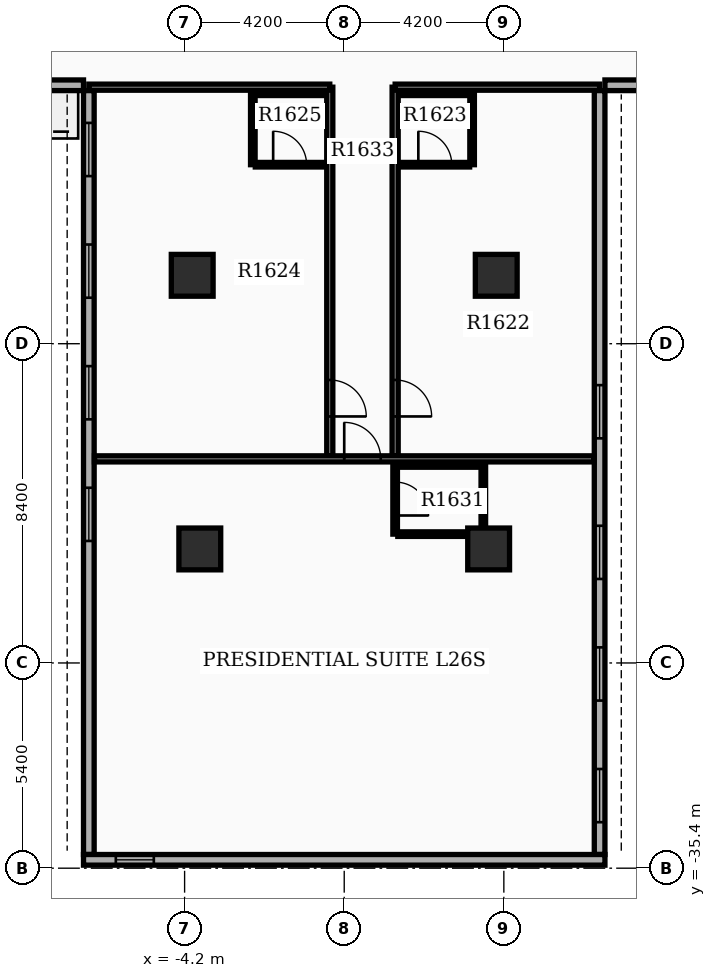
"""IFC4 building model, lengths in metres.
Left out: names, types, materials, properties, quantities, classifications, styles, units other than length and angle.
Written with IfcOpenShell. Run it as: python <this file> out.ifc"""

import sys

from ifc_helpers import new_model, si_unit, direction, frame, frame_2d, origin, origin_2d, place, context, subcontext, project, spatial, rectangle, extrude, element, fill, save


model = new_model("IFC4")
c1 = context("Model", 3, precision=1e-05, world=origin(), true_north=direction((0.0, 1.0)))
c2 = subcontext(c1, "Body", "Model", "MODEL_VIEW")
j1 = project(units=[si_unit("LENGTHUNIT", "METRE"), si_unit("PLANEANGLEUNIT", "RADIAN")], contexts=[c1])
p1 = place(None, origin())
s1 = spatial("IfcSite", under=j1, at=p1, CompositionType="ELEMENT")
p2 = place(p1, origin())
s2 = spatial("IfcBuilding", under=s1, at=p2, CompositionType="ELEMENT")
p3 = place(p2, frame((0.0, 0.0, 104.7)))
s3 = spatial("IfcBuildingStorey", under=s2, at=p3, CompositionType="ELEMENT", Elevation=104.7)
for number, where, z_axis, x_axis in (
    (1, (-4.0, -19.8, 0.0), (0.0, 0.0, 1.0), (1.0, 0.0, 0.0)),
    (2, (4.0, -19.8, 0.0), (0.0, 0.0, 1.0), (1.0, 0.0, 0.0)),
    (3, (-3.8, -27.0, 0.0), (0.0, 0.0, 1.0), (1.0, 0.0, 0.0)),
    (4, (3.8, -27.0, 0.0), (0.0, 0.0, 1.0), (1.0, 0.0, 0.0)),
):
    element("IfcColumn", number, at=place(p3, frame(where, z_axis=z_axis, x_axis=x_axis)), inside=s3, PredefinedType="COLUMN", context=c2, shape_type="SweptSolid", body=[
        extrude(rectangle(XDim=1.1, YDim=1.1, at=origin_2d()), origin(), (0.0, 0.0, 1.0), 3.9),
    ])
p4 = place(p3, frame((-6.72, -14.94, 0.0), z_axis=(0.0, 0.0, 1.0), x_axis=(0.0, -1.0, 0.0)))
e5 = element("IfcWall", 5, at=p4, inside=s3, PredefinedType="STANDARD", context=c2, shape_type="SweptSolid", body=[
    extrude(rectangle(XDim=20.1, YDim=0.28, at=frame_2d((10.05, 0.0))), origin(), (0.0, 0.0, 1.0), 2.97),
])
p5 = place(p4, frame((0.85, 0.0, 0.8)))
e6 = element("IfcOpeningElement", 6, at=p5, cuts=e5, PredefinedType="OPENING", context=c2, shape_type="SweptSolid", body=[
    extrude(rectangle(XDim=1.4, YDim=1.6, at=frame_2d((0.7, 0.8))), frame((0.0, 0.15, 0.0), z_axis=(0.0, -1.0, 0.0), x_axis=(1.0, 0.0, 0.0)), (0.0, 0.0, 1.0), 0.3),
])
p6 = place(p4, frame((4.05, 0.0, 0.8)))
e7 = element("IfcOpeningElement", 7, at=p6, cuts=e5, PredefinedType="OPENING", context=c2, shape_type="SweptSolid", body=[
    extrude(rectangle(XDim=1.4, YDim=1.6, at=frame_2d((0.7, 0.8))), frame((0.0, 0.15, 0.0), z_axis=(0.0, -1.0, 0.0), x_axis=(1.0, 0.0, 0.0)), (0.0, 0.0, 1.0), 0.3),
])
p7 = place(p4, frame((7.25, 0.0, 0.8)))
e8 = element("IfcOpeningElement", 8, at=p7, cuts=e5, PredefinedType="OPENING", context=c2, shape_type="SweptSolid", body=[
    extrude(rectangle(XDim=1.4, YDim=1.6, at=frame_2d((0.7, 0.8))), frame((0.0, 0.15, 0.0), z_axis=(0.0, -1.0, 0.0), x_axis=(1.0, 0.0, 0.0)), (0.0, 0.0, 1.0), 0.3),
])
p8 = place(p4, frame((10.45, 0.0, 0.8)))
e9 = element("IfcOpeningElement", 9, at=p8, cuts=e5, PredefinedType="OPENING", context=c2, shape_type="SweptSolid", body=[
    extrude(rectangle(XDim=1.4, YDim=1.6, at=frame_2d((0.7, 0.8))), frame((0.0, 0.15, 0.0), z_axis=(0.0, -1.0, 0.0), x_axis=(1.0, 0.0, 0.0)), (0.0, 0.0, 1.0), 0.3),
])
p9 = place(p3, frame((6.72, -35.04, 0.0), z_axis=(0.0, 0.0, 1.0), x_axis=(0.0, 1.0, 0.0)))
e10 = element("IfcWall", 10, at=p9, inside=s3, PredefinedType="STANDARD", context=c2, shape_type="SweptSolid", body=[
    extrude(rectangle(XDim=20.1, YDim=0.28, at=frame_2d((10.05, 0.0))), origin(), (0.0, 0.0, 1.0), 2.97),
])
p10 = place(p9, frame((0.85, 0.0, 0.8)))
e11 = element("IfcOpeningElement", 11, at=p10, cuts=e10, PredefinedType="OPENING", context=c2, shape_type="SweptSolid", body=[
    extrude(rectangle(XDim=1.4, YDim=1.6, at=frame_2d((0.7, 0.8))), frame((0.0, 0.15, 0.0), z_axis=(0.0, -1.0, 0.0), x_axis=(1.0, 0.0, 0.0)), (0.0, 0.0, 1.0), 0.3),
])
p11 = place(p9, frame((4.05, 0.0, 0.8)))
e12 = element("IfcOpeningElement", 12, at=p11, cuts=e10, PredefinedType="OPENING", context=c2, shape_type="SweptSolid", body=[
    extrude(rectangle(XDim=1.4, YDim=1.6, at=frame_2d((0.7, 0.8))), frame((0.0, 0.15, 0.0), z_axis=(0.0, -1.0, 0.0), x_axis=(1.0, 0.0, 0.0)), (0.0, 0.0, 1.0), 0.3),
])
p12 = place(p9, frame((7.25, 0.0, 0.8)))
e13 = element("IfcOpeningElement", 13, at=p12, cuts=e10, PredefinedType="OPENING", context=c2, shape_type="SweptSolid", body=[
    extrude(rectangle(XDim=1.4, YDim=1.6, at=frame_2d((0.7, 0.8))), frame((0.0, 0.15, 0.0), z_axis=(0.0, -1.0, 0.0), x_axis=(1.0, 0.0, 0.0)), (0.0, 0.0, 1.0), 0.3),
])
p13 = place(p9, frame((10.95, 0.0, 0.8)))
e14 = element("IfcOpeningElement", 14, at=p13, cuts=e10, PredefinedType="OPENING", context=c2, shape_type="SweptSolid", body=[
    extrude(rectangle(XDim=1.4, YDim=1.6, at=frame_2d((0.7, 0.8))), frame((0.0, 0.15, 0.0), z_axis=(0.0, -1.0, 0.0), x_axis=(1.0, 0.0, 0.0)), (0.0, 0.0, 1.0), 0.3),
])
p14 = place(p3, frame((-6.86, -35.18, 0.0), z_axis=(0.0, 0.0, 1.0), x_axis=(1.0, 0.0, 0.0)))
e15 = element("IfcWall", 15, at=p14, inside=s3, PredefinedType="STANDARD", context=c2, shape_type="SweptSolid", body=[
    extrude(rectangle(XDim=13.72, YDim=0.28, at=frame_2d((6.86, 0.0))), origin(), (0.0, 0.0, 1.0), 2.97),
])
p15 = place(p14, frame((0.85, 0.0, 0.85)))
e16 = element("IfcOpeningElement", 16, at=p15, cuts=e15, PredefinedType="OPENING", context=c2, shape_type="SweptSolid", body=[
    extrude(rectangle(XDim=1.0, YDim=1.5, at=frame_2d((0.5, 0.75))), frame((0.0, 0.15, 0.0), z_axis=(0.0, -1.0, 0.0), x_axis=(1.0, 0.0, 0.0)), (0.0, 0.0, 1.0), 0.3),
])
for number, where, z_axis, x_axis in (
    (17, (-13.16, -14.8, 0.0), (0.0, 0.0, 1.0), (1.0, 0.0, 0.0)),
    (18, (13.16, -14.8, 0.0), (0.0, 0.0, 1.0), (-1.0, 0.0, 0.0)),
):
    element("IfcWall", number, at=place(p3, frame(where, z_axis=z_axis, x_axis=x_axis)), inside=s3, PredefinedType="STANDARD", context=c2, shape_type="SweptSolid", body=[
        extrude(rectangle(XDim=6.3, YDim=0.28, at=frame_2d((3.15, 0.0))), origin(), (0.0, 0.0, 1.0), 2.97),
    ])
p16 = place(p3, frame((1.34, -14.85, 0.0), z_axis=(0.0, 0.0, 1.0), x_axis=(0.0, -1.0, 0.0)))
e19 = element("IfcWall", 19, at=p16, inside=s3, PredefinedType="PARTITIONING", context=c2, shape_type="SweptSolid", body=[
    extrude(rectangle(XDim=9.7, YDim=0.16, at=frame_2d((4.85, 0.0))), origin(), (0.0, 0.0, 1.0), 2.96),
])
p17 = place(p16, frame((7.704, 0.0, 0.0)))
e20 = element("IfcOpeningElement", 20, at=p17, cuts=e19, PredefinedType="OPENING", context=c2, shape_type="SweptSolid", body=[
    extrude(rectangle(XDim=0.96, YDim=2.15, at=frame_2d((0.48, 1.075))), frame((0.0, 0.09, 0.0), z_axis=(0.0, -1.0, 0.0), x_axis=(1.0, 0.0, 0.0)), (0.0, 0.0, 1.0), 0.18),
])
p18 = place(p3, frame((1.34, -14.85, 0.0), z_axis=(0.0, 0.0, 1.0), x_axis=(1.0, 0.0, 0.0)))
e21 = element("IfcWall", 21, at=p18, inside=s3, PredefinedType="PARTITIONING", context=c2, shape_type="SweptSolid", body=[
    extrude(rectangle(XDim=5.38, YDim=0.16, at=frame_2d((2.69, 0.0))), origin(), (0.0, 0.0, 1.0), 2.96),
])
p19 = place(p3, frame((1.48, -16.89, 0.0), z_axis=(0.0, 0.0, 1.0), x_axis=(1.0, 0.0, 0.0)))
e22 = element("IfcWall", 22, at=p19, inside=s3, PredefinedType="PARTITIONING", context=c2, shape_type="SweptSolid", body=[
    extrude(rectangle(XDim=1.82, YDim=0.12, at=frame_2d((0.91, 0.0))), origin(), (0.0, 0.0, 1.0), 2.96),
])
p20 = place(p19, frame((0.47, 0.0, 0.0)))
e23 = element("IfcOpeningElement", 23, at=p20, cuts=e22, PredefinedType="OPENING", context=c2, shape_type="SweptSolid", body=[
    extrude(rectangle(XDim=0.88, YDim=2.1, at=frame_2d((0.44, 1.05))), frame((0.0, 0.07, 0.0), z_axis=(0.0, -1.0, 0.0), x_axis=(1.0, 0.0, 0.0)), (0.0, 0.0, 1.0), 0.14),
])
p21 = place(p3, frame((1.48, -15.01, 0.0), z_axis=(0.0, 0.0, 1.0), x_axis=(1.0, 0.0, 0.0)))
e24 = element("IfcWall", 24, at=p21, inside=s3, PredefinedType="PARTITIONING", context=c2, shape_type="SweptSolid", body=[
    extrude(rectangle(XDim=1.82, YDim=0.12, at=frame_2d((0.91, 0.0))), origin(), (0.0, 0.0, 1.0), 2.96),
])
p22 = place(p3, frame((3.365, -15.01, 0.0), z_axis=(0.0, 0.0, 1.0), x_axis=(0.0, -1.0, 0.0)))
e25 = element("IfcWall", 25, at=p22, inside=s3, PredefinedType="PARTITIONING", context=c2, shape_type="SweptSolid", body=[
    extrude(rectangle(XDim=1.88, YDim=0.12, at=frame_2d((0.94, 0.0))), origin(), (0.0, 0.0, 1.0), 2.96),
])
p23 = place(p3, frame((-0.38, -14.85, 0.0), z_axis=(0.0, 0.0, 1.0), x_axis=(0.0, -1.0, 0.0)))
e26 = element("IfcWall", 26, at=p23, inside=s3, PredefinedType="PARTITIONING", context=c2, shape_type="SweptSolid", body=[
    extrude(rectangle(XDim=9.7, YDim=0.16, at=frame_2d((4.85, 0.0))), origin(), (0.0, 0.0, 1.0), 2.96),
])
p24 = place(p23, frame((7.704, 0.0, 0.0)))
e27 = element("IfcOpeningElement", 27, at=p24, cuts=e26, PredefinedType="OPENING", context=c2, shape_type="SweptSolid", body=[
    extrude(rectangle(XDim=0.96, YDim=2.15, at=frame_2d((0.48, 1.075))), frame((0.0, 0.09, 0.0), z_axis=(0.0, -1.0, 0.0), x_axis=(1.0, 0.0, 0.0)), (0.0, 0.0, 1.0), 0.18),
])
p25 = place(p3, frame((-0.38, -14.85, 0.0), z_axis=(0.0, 0.0, 1.0), x_axis=(-1.0, 0.0, 0.0)))
e28 = element("IfcWall", 28, at=p25, inside=s3, PredefinedType="PARTITIONING", context=c2, shape_type="SweptSolid", body=[
    extrude(rectangle(XDim=6.34, YDim=0.16, at=frame_2d((3.17, 0.0))), origin(), (0.0, 0.0, 1.0), 2.96),
])
p26 = place(p3, frame((-2.34, -16.89, 0.0), z_axis=(0.0, 0.0, 1.0), x_axis=(1.0, 0.0, 0.0)))
e29 = element("IfcWall", 29, at=p26, inside=s3, PredefinedType="PARTITIONING", context=c2, shape_type="SweptSolid", body=[
    extrude(rectangle(XDim=1.82, YDim=0.12, at=frame_2d((0.91, 0.0))), origin(), (0.0, 0.0, 1.0), 2.96),
])
p27 = place(p26, frame((0.47, 0.0, 0.0)))
e30 = element("IfcOpeningElement", 30, at=p27, cuts=e29, PredefinedType="OPENING", context=c2, shape_type="SweptSolid", body=[
    extrude(rectangle(XDim=0.88, YDim=2.1, at=frame_2d((0.44, 1.05))), frame((0.0, 0.07, 0.0), z_axis=(0.0, -1.0, 0.0), x_axis=(1.0, 0.0, 0.0)), (0.0, 0.0, 1.0), 0.14),
])
p28 = place(p3, frame((-2.34, -15.01, 0.0), z_axis=(0.0, 0.0, 1.0), x_axis=(1.0, 0.0, 0.0)))
e31 = element("IfcWall", 31, at=p28, inside=s3, PredefinedType="PARTITIONING", context=c2, shape_type="SweptSolid", body=[
    extrude(rectangle(XDim=1.82, YDim=0.12, at=frame_2d((0.91, 0.0))), origin(), (0.0, 0.0, 1.0), 2.96),
])
p29 = place(p3, frame((-2.405, -15.01, 0.0), z_axis=(0.0, 0.0, 1.0), x_axis=(0.0, -1.0, 0.0)))
e32 = element("IfcWall", 32, at=p29, inside=s3, PredefinedType="PARTITIONING", context=c2, shape_type="SweptSolid", body=[
    extrude(rectangle(XDim=1.88, YDim=0.12, at=frame_2d((0.94, 0.0))), origin(), (0.0, 0.0, 1.0), 2.96),
])
p30 = place(p3, frame((-6.572, -24.63, 0.0), z_axis=(0.0, 0.0, 1.0), x_axis=(1.0, 0.0, 0.0)))
e33 = element("IfcWall", 33, at=p30, inside=s3, PredefinedType="PARTITIONING", context=c2, shape_type="SweptSolid", body=[
    extrude(rectangle(XDim=13.144, YDim=0.16, at=frame_2d((6.572, 0.0))), origin(), (0.0, 0.0, 1.0), 2.96),
])
p31 = place(p30, frame((6.572, 0.0, 0.0)))
e34 = element("IfcOpeningElement", 34, at=p31, cuts=e33, PredefinedType="OPENING", context=c2, shape_type="SweptSolid", body=[
    extrude(rectangle(XDim=0.96, YDim=2.15, at=frame_2d((0.48, 1.075))), frame((0.0, 0.09, 0.0), z_axis=(0.0, -1.0, 0.0), x_axis=(1.0, 0.0, 0.0)), (0.0, 0.0, 1.0), 0.18),
])
p32 = place(p3, frame((1.34, -24.79, 0.0), z_axis=(0.0, 0.0, 1.0), x_axis=(0.0, -1.0, 0.0)))
e35 = element("IfcWall", 35, at=p32, inside=s3, PredefinedType="PARTITIONING", context=c2, shape_type="SweptSolid", body=[
    extrude(rectangle(XDim=1.82, YDim=0.12, at=frame_2d((0.91, 0.0))), origin(), (0.0, 0.0, 1.0), 2.96),
])
p33 = place(p32, frame((0.45, 0.0, 0.0)))
e36 = element("IfcOpeningElement", 36, at=p33, cuts=e35, PredefinedType="OPENING", context=c2, shape_type="SweptSolid", body=[
    extrude(rectangle(XDim=0.88, YDim=2.1, at=frame_2d((0.44, 1.05))), frame((0.0, 0.07, 0.0), z_axis=(0.0, -1.0, 0.0), x_axis=(1.0, 0.0, 0.0)), (0.0, 0.0, 1.0), 0.14),
])
p34 = place(p3, frame((3.66, -24.79, 0.0), z_axis=(0.0, 0.0, 1.0), x_axis=(0.0, -1.0, 0.0)))
e37 = element("IfcWall", 37, at=p34, inside=s3, PredefinedType="PARTITIONING", context=c2, shape_type="SweptSolid", body=[
    extrude(rectangle(XDim=1.82, YDim=0.12, at=frame_2d((0.91, 0.0))), origin(), (0.0, 0.0, 1.0), 2.96),
])
for number, where, z_axis, x_axis in (
    (38, (1.41, -24.79, 0.0), (0.0, 0.0, 1.0), (1.0, 0.0, 0.0)),
    (39, (1.41, -26.61, 0.0), (0.0, 0.0, 1.0), (1.0, 0.0, 0.0)),
):
    element("IfcWall", number, at=place(p3, frame(where, z_axis=z_axis, x_axis=x_axis)), inside=s3, PredefinedType="PARTITIONING", context=c2, shape_type="SweptSolid", body=[
        extrude(rectangle(XDim=2.18, YDim=0.12, at=frame_2d((1.09, 0.0))), origin(), (0.0, 0.0, 1.0), 2.96),
    ])
p35 = place(p5, origin())
e40 = element("IfcWindow", 40, at=p35, inside=s3, PartitioningType="SINGLE_PANEL", PredefinedType="WINDOW", context=c2, shape_type="SweptSolid", body=[
    extrude(rectangle(XDim=1.4, YDim=1.6, at=frame_2d((0.7, 0.8))), frame((0.0, 0.03, 0.0), z_axis=(0.0, -1.0, 0.0), x_axis=(1.0, 0.0, 0.0)), (0.0, 0.0, 1.0), 0.06),
])
fill(e6, e40)
p36 = place(p6, origin())
e41 = element("IfcWindow", 41, at=p36, inside=s3, PartitioningType="SINGLE_PANEL", PredefinedType="WINDOW", context=c2, shape_type="SweptSolid", body=[
    extrude(rectangle(XDim=1.4, YDim=1.6, at=frame_2d((0.7, 0.8))), frame((0.0, 0.03, 0.0), z_axis=(0.0, -1.0, 0.0), x_axis=(1.0, 0.0, 0.0)), (0.0, 0.0, 1.0), 0.06),
])
fill(e7, e41)
p37 = place(p7, origin())
e42 = element("IfcWindow", 42, at=p37, inside=s3, PartitioningType="SINGLE_PANEL", PredefinedType="WINDOW", context=c2, shape_type="SweptSolid", body=[
    extrude(rectangle(XDim=1.4, YDim=1.6, at=frame_2d((0.7, 0.8))), frame((0.0, 0.03, 0.0), z_axis=(0.0, -1.0, 0.0), x_axis=(1.0, 0.0, 0.0)), (0.0, 0.0, 1.0), 0.06),
])
fill(e8, e42)
p38 = place(p8, origin())
e43 = element("IfcWindow", 43, at=p38, inside=s3, PartitioningType="SINGLE_PANEL", PredefinedType="WINDOW", context=c2, shape_type="SweptSolid", body=[
    extrude(rectangle(XDim=1.4, YDim=1.6, at=frame_2d((0.7, 0.8))), frame((0.0, 0.03, 0.0), z_axis=(0.0, -1.0, 0.0), x_axis=(1.0, 0.0, 0.0)), (0.0, 0.0, 1.0), 0.06),
])
fill(e9, e43)
p39 = place(p10, origin())
e44 = element("IfcWindow", 44, at=p39, inside=s3, PartitioningType="SINGLE_PANEL", PredefinedType="WINDOW", context=c2, shape_type="SweptSolid", body=[
    extrude(rectangle(XDim=1.4, YDim=1.6, at=frame_2d((0.7, 0.8))), frame((0.0, 0.03, 0.0), z_axis=(0.0, -1.0, 0.0), x_axis=(1.0, 0.0, 0.0)), (0.0, 0.0, 1.0), 0.06),
])
fill(e11, e44)
p40 = place(p11, origin())
e45 = element("IfcWindow", 45, at=p40, inside=s3, PartitioningType="SINGLE_PANEL", PredefinedType="WINDOW", context=c2, shape_type="SweptSolid", body=[
    extrude(rectangle(XDim=1.4, YDim=1.6, at=frame_2d((0.7, 0.8))), frame((0.0, 0.03, 0.0), z_axis=(0.0, -1.0, 0.0), x_axis=(1.0, 0.0, 0.0)), (0.0, 0.0, 1.0), 0.06),
])
fill(e12, e45)
p41 = place(p12, origin())
e46 = element("IfcWindow", 46, at=p41, inside=s3, PartitioningType="SINGLE_PANEL", PredefinedType="WINDOW", context=c2, shape_type="SweptSolid", body=[
    extrude(rectangle(XDim=1.4, YDim=1.6, at=frame_2d((0.7, 0.8))), frame((0.0, 0.03, 0.0), z_axis=(0.0, -1.0, 0.0), x_axis=(1.0, 0.0, 0.0)), (0.0, 0.0, 1.0), 0.06),
])
fill(e13, e46)
p42 = place(p13, origin())
e47 = element("IfcWindow", 47, at=p42, inside=s3, PartitioningType="SINGLE_PANEL", PredefinedType="WINDOW", context=c2, shape_type="SweptSolid", body=[
    extrude(rectangle(XDim=1.4, YDim=1.6, at=frame_2d((0.7, 0.8))), frame((0.0, 0.03, 0.0), z_axis=(0.0, -1.0, 0.0), x_axis=(1.0, 0.0, 0.0)), (0.0, 0.0, 1.0), 0.06),
])
fill(e14, e47)
p43 = place(p15, origin())
e48 = element("IfcWindow", 48, at=p43, inside=s3, PartitioningType="SINGLE_PANEL", PredefinedType="WINDOW", context=c2, shape_type="SweptSolid", body=[
    extrude(rectangle(XDim=1.0, YDim=1.5, at=frame_2d((0.5, 0.75))), frame((0.0, 0.03, 0.0), z_axis=(0.0, -1.0, 0.0), x_axis=(1.0, 0.0, 0.0)), (0.0, 0.0, 1.0), 0.06),
])
fill(e16, e48)
p44 = place(p17, origin())
e49 = element("IfcDoor", 49, at=p44, inside=s3, OperationType="SINGLE_SWING_RIGHT", PredefinedType="DOOR", context=c2, shape_type="SweptSolid", body=[
    extrude(rectangle(XDim=0.96, YDim=2.15, at=frame_2d((0.48, 1.075))), frame((0.0, 0.025, 0.0), z_axis=(0.0, -1.0, 0.0), x_axis=(1.0, 0.0, 0.0)), (0.0, 0.0, 1.0), 0.05),
])
fill(e20, e49)
p45 = place(p20, origin())
e50 = element("IfcDoor", 50, at=p45, inside=s3, OperationType="SINGLE_SWING_LEFT", PredefinedType="DOOR", context=c2, shape_type="SweptSolid", body=[
    extrude(rectangle(XDim=0.88, YDim=2.1, at=frame_2d((0.44, 1.05))), frame((0.0, 0.025, 0.0), z_axis=(0.0, -1.0, 0.0), x_axis=(1.0, 0.0, 0.0)), (0.0, 0.0, 1.0), 0.05),
])
fill(e23, e50)
p46 = place(p24, origin())
e51 = element("IfcDoor", 51, at=p46, inside=s3, OperationType="SINGLE_SWING_RIGHT", PredefinedType="DOOR", context=c2, shape_type="SweptSolid", body=[
    extrude(rectangle(XDim=0.96, YDim=2.15, at=frame_2d((0.48, 1.075))), frame((0.0, 0.025, 0.0), z_axis=(0.0, -1.0, 0.0), x_axis=(1.0, 0.0, 0.0)), (0.0, 0.0, 1.0), 0.05),
])
fill(e27, e51)
p47 = place(p27, origin())
e52 = element("IfcDoor", 52, at=p47, inside=s3, OperationType="SINGLE_SWING_LEFT", PredefinedType="DOOR", context=c2, shape_type="SweptSolid", body=[
    extrude(rectangle(XDim=0.88, YDim=2.1, at=frame_2d((0.44, 1.05))), frame((0.0, 0.025, 0.0), z_axis=(0.0, -1.0, 0.0), x_axis=(1.0, 0.0, 0.0)), (0.0, 0.0, 1.0), 0.05),
])
fill(e30, e52)
p48 = place(p31, origin())
e53 = element("IfcDoor", 53, at=p48, inside=s3, OperationType="SINGLE_SWING_LEFT", PredefinedType="DOOR", context=c2, shape_type="SweptSolid", body=[
    extrude(rectangle(XDim=0.96, YDim=2.15, at=frame_2d((0.48, 1.075))), frame((0.0, 0.025, 0.0), z_axis=(0.0, -1.0, 0.0), x_axis=(1.0, 0.0, 0.0)), (0.0, 0.0, 1.0), 0.05),
])
fill(e34, e53)
p49 = place(p33, origin())
e54 = element("IfcDoor", 54, at=p49, inside=s3, OperationType="SINGLE_SWING_RIGHT", PredefinedType="DOOR", context=c2, shape_type="SweptSolid", body=[
    extrude(rectangle(XDim=0.88, YDim=2.1, at=frame_2d((0.44, 1.05))), frame((0.0, 0.025, 0.0), z_axis=(0.0, -1.0, 0.0), x_axis=(1.0, 0.0, 0.0)), (0.0, 0.0, 1.0), 0.05),
])
fill(e36, e54)
save(model, sys.argv[1])
